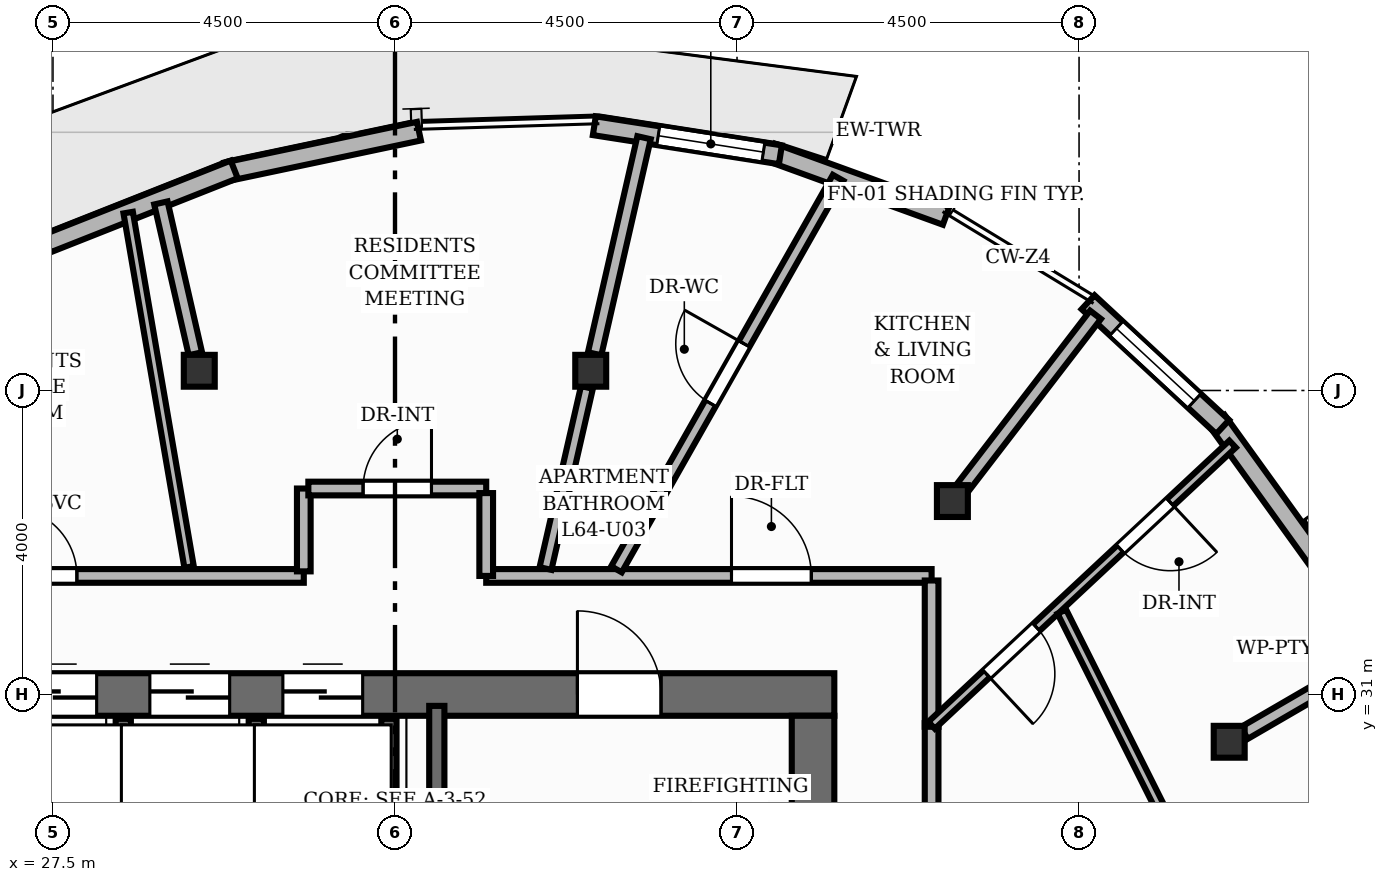
"""IFC4 building model, lengths in metres.
Left out: names, types, materials, properties, quantities, classifications, styles, units other than length and angle.
Written with IfcOpenShell. Run it as: python <this file> out.ifc"""

import sys

from ifc_helpers import new_model, si_unit, direction, frame, frame_2d, origin, origin_2d, place, context, subcontext, project, spatial, rectangle, i_section, extrude, element, fill, save


model = new_model("IFC4")
c1 = context("Model", 3, precision=1e-05, world=origin(), true_north=direction((0.0, 1.0)))
c2 = subcontext(c1, "Body", "Model", "MODEL_VIEW")
j1 = project(units=[si_unit("LENGTHUNIT", "METRE"), si_unit("PLANEANGLEUNIT", "RADIAN")], contexts=[c1])
p1 = place(None, origin())
s1 = spatial("IfcSite", under=j1, at=p1, CompositionType="ELEMENT")
p2 = place(p1, origin())
s2 = spatial("IfcBuilding", under=s1, at=p2, CompositionType="ELEMENT")
p3 = place(p2, frame((0.0, 0.0, 214.24)))
s3 = spatial("IfcBuildingStorey", under=s2, at=p3, CompositionType="ELEMENT", Elevation=214.24)
p4 = place(p3, frame((26.22, 31.0, 0.0), z_axis=(0.0, 0.0, 1.0), x_axis=(1.0, 0.0, 0.0)))
e1 = element("IfcWall", 1, at=p4, inside=s3, PredefinedType="SHEAR", context=c2, shape_type="SweptSolid", body=[
    extrude(rectangle(XDim=11.56, YDim=0.56, at=frame_2d((5.78, 0.0))), origin(), (0.0, 0.0, 1.0), 3.2),
])
p5 = place(p4, frame((8.18, 0.0, 0.0)))
e2 = element("IfcOpeningElement", 2, at=p5, cuts=e1, PredefinedType="OPENING", context=c2, shape_type="SweptSolid", body=[
    extrude(rectangle(XDim=1.1, YDim=2.15, at=frame_2d((0.55, 1.075))), frame((0.0, 0.29, 0.0), z_axis=(0.0, -1.0, 0.0), x_axis=(1.0, 0.0, 0.0)), (0.0, 0.0, 1.0), 0.58),
])
p6 = place(p4, frame((0.805, 0.0, 0.0)))
e3 = element("IfcOpeningElement", 3, at=p6, cuts=e1, PredefinedType="OPENING", context=c2, shape_type="SweptSolid", body=[
    extrude(rectangle(XDim=1.05, YDim=2.15, at=frame_2d((0.525, 1.075))), frame((0.0, 0.29, 0.0), z_axis=(0.0, -1.0, 0.0), x_axis=(1.0, 0.0, 0.0)), (0.0, 0.0, 1.0), 0.58),
])
p7 = place(p4, frame((2.555, 0.0, 0.0)))
e4 = element("IfcOpeningElement", 4, at=p7, cuts=e1, PredefinedType="OPENING", context=c2, shape_type="SweptSolid", body=[
    extrude(rectangle(XDim=1.05, YDim=2.15, at=frame_2d((0.525, 1.075))), frame((0.0, 0.29, 0.0), z_axis=(0.0, -1.0, 0.0), x_axis=(1.0, 0.0, 0.0)), (0.0, 0.0, 1.0), 0.58),
])
p8 = place(p4, frame((4.305, 0.0, 0.0)))
e5 = element("IfcOpeningElement", 5, at=p8, cuts=e1, PredefinedType="OPENING", context=c2, shape_type="SweptSolid", body=[
    extrude(rectangle(XDim=1.05, YDim=2.15, at=frame_2d((0.525, 1.075))), frame((0.0, 0.29, 0.0), z_axis=(0.0, -1.0, 0.0), x_axis=(1.0, 0.0, 0.0)), (0.0, 0.0, 1.0), 0.58),
])
p9 = place(p3, frame((37.5, 17.28, 0.0), z_axis=(0.0, 0.0, 1.0), x_axis=(0.0, 1.0, 0.0)))
e6 = element("IfcWall", 6, at=p9, inside=s3, PredefinedType="SHEAR", context=c2, shape_type="SweptSolid", body=[
    extrude(rectangle(XDim=13.44, YDim=0.56, at=frame_2d((6.72, 0.0))), origin(), (0.0, 0.0, 1.0), 3.2),
])
for number, where, z_axis, x_axis in (
    (7, (42.975, 30.378, 0.0), (0.0, 0.0, 1.0), (1.0, 0.0, 0.0)),
    (8, (39.333, 33.545, 0.0), (0.0, 0.0, 1.0), (1.0, 0.0, 0.0)),
    (9, (34.575, 35.26, 0.0), (0.0, 0.0, 1.0), (1.0, 0.0, 0.0)),
    (10, (29.425, 35.26, 0.0), (0.0, 0.0, 1.0), (1.0, 0.0, 0.0)),
):
    element("IfcColumn", number, at=place(p3, frame(where, z_axis=z_axis, x_axis=x_axis)), inside=s3, PredefinedType="COLUMN", context=c2, shape_type="SweptSolid", body=[
        extrude(i_section(OverallWidth=0.407, OverallDepth=0.419, WebThickness=0.031, FlangeThickness=0.049, at=origin_2d()), origin(), (0.0, 0.0, 1.0), 3.2),
    ])
p10 = place(p3, frame((36.96, 38.13, 0.0), z_axis=(0.0, 0.0, 1.0), x_axis=(0.939954186413, -0.341300640851, 0.0)))
e11 = element("IfcWall", 11, at=p10, inside=s3, PredefinedType="SOLIDWALL", context=c2, shape_type="SweptSolid", body=[
    extrude(rectangle(XDim=2.437, YDim=0.25, at=frame_2d((1.219, 0.0))), origin(), (0.0, 0.0, 1.0), 2.96),
])
p11 = place(p3, frame((34.622, 38.484, 0.0), z_axis=(0.0, 0.0, 1.0), x_axis=(0.988040195026, -0.154196540209, 0.0)))
e12 = element("IfcWall", 12, at=p11, inside=s3, PredefinedType="SOLIDWALL", context=c2, shape_type="SweptSolid", body=[
    extrude(rectangle(XDim=2.478, YDim=0.25, at=frame_2d((1.239, 0.0))), origin(), (0.0, 0.0, 1.0), 2.96),
])
p12 = place(p11, frame((0.851, 0.0, 0.85)))
e13 = element("IfcOpeningElement", 13, at=p12, cuts=e12, PredefinedType="OPENING", context=c2, shape_type="SweptSolid", body=[
    extrude(rectangle(XDim=1.4, YDim=1.52, at=frame_2d((0.7, 0.76))), frame((0.0, 0.135, 0.0), z_axis=(0.0, -1.0, 0.0), x_axis=(1.0, 0.0, 0.0)), (0.0, 0.0, 1.0), 0.27),
])
p13 = place(p3, frame((29.779, 37.877, 0.0), z_axis=(0.0, 0.0, 1.0), x_axis=(0.978434707222, 0.206556345104, 0.0)))
e14 = element("IfcWall", 14, at=p13, inside=s3, PredefinedType="SOLIDWALL", context=c2, shape_type="SweptSolid", body=[
    extrude(rectangle(XDim=2.592, YDim=0.25, at=frame_2d((1.296, 0.0))), origin(), (0.0, 0.0, 1.0), 2.96),
])
p14 = place(p3, frame((27.42, 36.933, 0.0), z_axis=(0.0, 0.0, 1.0), x_axis=(0.929861098324, 0.36791077427, 0.0)))
e15 = element("IfcWall", 15, at=p14, inside=s3, PredefinedType="SOLIDWALL", context=c2, shape_type="SweptSolid", body=[
    extrude(rectangle(XDim=2.651, YDim=0.25, at=frame_2d((1.326, 0.0))), origin(), (0.0, 0.0, 1.0), 2.96),
])
p15 = place(p3, frame((42.814, 34.605, 0.0), z_axis=(0.0, 0.0, 1.0), x_axis=(0.584824573101, -0.811159798497, 0.0)))
e16 = element("IfcWall", 16, at=p15, inside=s3, PredefinedType="SOLIDWALL", context=c2, shape_type="SweptSolid", body=[
    extrude(rectangle(XDim=2.437, YDim=0.25, at=frame_2d((1.218, 0.0))), origin(), (0.0, 0.0, 1.0), 2.96),
])
p16 = place(p3, frame((41.119, 36.161, 0.0), z_axis=(0.0, 0.0, 1.0), x_axis=(0.733441361842, -0.679752726173, 0.0)))
e17 = element("IfcWall", 17, at=p16, inside=s3, PredefinedType="SOLIDWALL", context=c2, shape_type="SweptSolid", body=[
    extrude(rectangle(XDim=2.415, YDim=0.25, at=frame_2d((1.207, 0.0))), origin(), (0.0, 0.0, 1.0), 2.96),
])
p17 = place(p16, frame((0.507, 0.0, 0.85)))
e18 = element("IfcOpeningElement", 18, at=p17, cuts=e17, PredefinedType="OPENING", context=c2, shape_type="SweptSolid", body=[
    extrude(rectangle(XDim=1.4, YDim=1.55, at=frame_2d((0.7, 0.775))), frame((0.0, 0.135, 0.0), z_axis=(0.0, -1.0, 0.0), x_axis=(1.0, 0.0, 0.0)), (0.0, 0.0, 1.0), 0.27),
])
p18 = place(p3, frame((32.55, 27.35, 0.0), z_axis=(0.0, 0.0, 1.0), x_axis=(0.0, 1.0, 0.0)))
e19 = element("IfcWall", 19, at=p18, inside=s3, PredefinedType="SHEAR", context=c2, shape_type="SweptSolid", body=[
    extrude(rectangle(XDim=3.5, YDim=0.2, at=frame_2d((1.75, 0.0))), origin(), (0.0, 0.0, 1.0), 3.2),
])
for number, where, z_axis, x_axis in (
    (20, (31.92, 29.02, 0.0), (0.0, 0.0, 1.0), (0.0, 1.0, 0.0)),
    (21, (28.425, 29.02, 0.0), (0.0, 0.0, 1.0), (0.0, 1.0, 0.0)),
    (22, (30.175, 29.02, 0.0), (0.0, 0.0, 1.0), (0.0, 1.0, 0.0)),
):
    element("IfcWall", number, at=place(p3, frame(where, z_axis=z_axis, x_axis=x_axis)), inside=s3, PredefinedType="SHEAR", context=c2, shape_type="SweptSolid", body=[
        extrude(rectangle(XDim=1.66, YDim=0.2, at=frame_2d((0.83, 0.0))), origin(), (0.0, 0.0, 1.0), 3.2),
    ])
p19 = place(p3, frame((43.174, 30.493, 0.0), z_axis=(0.0, 0.0, 1.0), x_axis=(0.864637155841, 0.502396843879, 0.0)))
e23 = element("IfcWall", 23, at=p19, inside=s3, PredefinedType="PARTITIONING", context=c2, shape_type="SweptSolid", body=[
    extrude(rectangle(XDim=1.803, YDim=0.18, at=frame_2d((0.901, 0.0))), origin(), (0.0, 0.0, 1.0), 2.403),
])
p20 = place(p3, frame((39.473, 33.727, 0.0), z_axis=(0.0, 0.0, 1.0), x_axis=(0.609244614772, 0.792982344931, 0.0)))
e24 = element("IfcWall", 24, at=p20, inside=s3, PredefinedType="PARTITIONING", context=c2, shape_type="SweptSolid", body=[
    extrude(rectangle(XDim=2.861, YDim=0.18, at=frame_2d((1.43, 0.0))), origin(), (0.0, 0.0, 1.0), 2.403),
])
p21 = place(p3, frame((34.626, 35.483, 0.0), z_axis=(0.0, 0.0, 1.0), x_axis=(0.222945280676, 0.974830960641, 0.0)))
e25 = element("IfcWall", 25, at=p21, inside=s3, PredefinedType="PARTITIONING", context=c2, shape_type="SweptSolid", body=[
    extrude(rectangle(XDim=2.916, YDim=0.18, at=frame_2d((1.458, 0.0))), origin(), (0.0, 0.0, 1.0), 2.403),
])
p22 = place(p3, frame((29.374, 35.483, 0.0), z_axis=(0.0, 0.0, 1.0), x_axis=(-0.222932254148, 0.974833939736, 0.0)))
e26 = element("IfcWall", 26, at=p22, inside=s3, PredefinedType="PARTITIONING", context=c2, shape_type="SweptSolid", body=[
    extrude(rectangle(XDim=2.036, YDim=0.18, at=frame_2d((1.018, 0.0))), origin(), (0.0, 0.0, 1.0), 2.403),
])
p23 = place(p3, frame((39.06, 30.623, 0.0), z_axis=(0.0, 0.0, 1.0), x_axis=(0.0, -1.0, 0.0)))
e27 = element("IfcWall", 27, at=p23, inside=s3, PredefinedType="PARTITIONING", context=c2, shape_type="SweptSolid", body=[
    extrude(rectangle(XDim=15.183, YDim=0.18, at=frame_2d((7.591, 0.0))), origin(), (0.0, 0.0, 1.0), 2.955),
])
p24 = place(p23, frame((8.656, 0.0, 0.0)))
e28 = element("IfcOpeningElement", 28, at=p24, cuts=e27, PredefinedType="OPENING", context=c2, shape_type="SweptSolid", body=[
    extrude(rectangle(XDim=1.05, YDim=2.15, at=frame_2d((0.525, 1.075))), frame((0.0, 0.1, 0.0), z_axis=(0.0, -1.0, 0.0), x_axis=(1.0, 0.0, 0.0)), (0.0, 0.0, 1.0), 0.2),
])
p25 = place(p3, frame((33.2, 32.56, 0.0), z_axis=(0.0, 0.0, 1.0), x_axis=(1.0, 0.0, 0.0)))
e29 = element("IfcWall", 29, at=p25, inside=s3, PredefinedType="PARTITIONING", context=c2, shape_type="SweptSolid", body=[
    extrude(rectangle(XDim=5.86, YDim=0.18, at=frame_2d((2.93, 0.0))), origin(), (0.0, 0.0, 1.0), 2.955),
])
p26 = place(p25, frame((3.227, 0.0, 0.0)))
e30 = element("IfcOpeningElement", 30, at=p26, cuts=e29, PredefinedType="OPENING", context=c2, shape_type="SweptSolid", body=[
    extrude(rectangle(XDim=1.05, YDim=2.15, at=frame_2d((0.525, 1.075))), frame((0.0, 0.1, 0.0), z_axis=(0.0, -1.0, 0.0), x_axis=(1.0, 0.0, 0.0)), (0.0, 0.0, 1.0), 0.2),
])
p27 = place(p3, frame((39.06, 32.5, 0.0), z_axis=(0.0, 0.0, 1.0), x_axis=(0.0, -1.0, 0.0)))
e31 = element("IfcWall", 31, at=p27, inside=s3, PredefinedType="PARTITIONING", context=c2, shape_type="SweptSolid", body=[
    extrude(rectangle(XDim=1.925, YDim=0.18, at=frame_2d((0.962, 0.0))), origin(), (0.0, 0.0, 1.0), 2.955),
])
p28 = place(p3, frame((24.94, 32.56, 0.0), z_axis=(0.0, 0.0, 1.0), x_axis=(1.0, 0.0, 0.0)))
e32 = element("IfcWall", 32, at=p28, inside=s3, PredefinedType="PARTITIONING", context=c2, shape_type="SweptSolid", body=[
    extrude(rectangle(XDim=5.86, YDim=0.18, at=frame_2d((2.93, 0.0))), origin(), (0.0, 0.0, 1.0), 2.955),
])
p29 = place(p28, frame((1.975, 0.0, 0.0)))
e33 = element("IfcOpeningElement", 33, at=p29, cuts=e32, PredefinedType="OPENING", context=c2, shape_type="SweptSolid", body=[
    extrude(rectangle(XDim=0.9, YDim=2.1, at=frame_2d((0.45, 1.05))), frame((0.0, 0.1, 0.0), z_axis=(0.0, -1.0, 0.0), x_axis=(1.0, 0.0, 0.0)), (0.0, 0.0, 1.0), 0.2),
])
p30 = place(p3, frame((30.8, 32.62, 0.0), z_axis=(0.0, 0.0, 1.0), x_axis=(0.0, 1.0, 0.0)))
e34 = element("IfcWall", 34, at=p30, inside=s3, PredefinedType="PARTITIONING", context=c2, shape_type="SweptSolid", body=[
    extrude(rectangle(XDim=1.09, YDim=0.18, at=frame_2d((0.545, 0.0))), origin(), (0.0, 0.0, 1.0), 2.955),
])
p31 = place(p3, frame((30.86, 33.71, 0.0), z_axis=(0.0, 0.0, 1.0), x_axis=(1.0, 0.0, 0.0)))
e35 = element("IfcWall", 35, at=p31, inside=s3, PredefinedType="PARTITIONING", context=c2, shape_type="SweptSolid", body=[
    extrude(rectangle(XDim=2.34, YDim=0.18, at=frame_2d((1.17, 0.0))), origin(), (0.0, 0.0, 1.0), 2.955),
])
p32 = place(p31, frame((0.72, 0.0, 0.0)))
e36 = element("IfcOpeningElement", 36, at=p32, cuts=e35, PredefinedType="OPENING", context=c2, shape_type="SweptSolid", body=[
    extrude(rectangle(XDim=0.9, YDim=2.1, at=frame_2d((0.45, 1.05))), frame((0.0, 0.1, 0.0), z_axis=(0.0, -1.0, 0.0), x_axis=(1.0, 0.0, 0.0)), (0.0, 0.0, 1.0), 0.2),
])
p33 = place(p3, frame((33.2, 33.65, 0.0), z_axis=(0.0, 0.0, 1.0), x_axis=(0.0, -1.0, 0.0)))
e37 = element("IfcWall", 37, at=p33, inside=s3, PredefinedType="PARTITIONING", context=c2, shape_type="SweptSolid", body=[
    extrude(rectangle(XDim=1.09, YDim=0.18, at=frame_2d((0.545, 0.0))), origin(), (0.0, 0.0, 1.0), 2.955),
])
p34 = place(p3, frame((34.914, 32.647, 0.0), z_axis=(0.0, 0.0, 1.0), x_axis=(0.492777372346, 0.870155423648, 0.0)))
e38 = element("IfcWall", 38, at=p34, inside=s3, PredefinedType="PLUMBINGWALL", context=c2, shape_type="SweptSolid", body=[
    extrude(rectangle(XDim=5.919, YDim=0.16, at=frame_2d((2.96, 0.0))), origin(), (0.0, 0.0, 1.0), 2.692),
])
p35 = place(p34, frame((2.51, 0.0, 0.0)))
e39 = element("IfcOpeningElement", 39, at=p35, cuts=e38, PredefinedType="OPENING", context=c2, shape_type="SweptSolid", body=[
    extrude(rectangle(XDim=0.9, YDim=2.1, at=frame_2d((0.45, 1.05))), frame((0.0, 0.09, 0.0), z_axis=(0.0, -1.0, 0.0), x_axis=(1.0, 0.0, 0.0)), (0.0, 0.0, 1.0), 0.18),
])
p36 = place(p3, frame((43.02, 34.294, 0.0), z_axis=(0.0, 0.0, 1.0), x_axis=(-0.730757039427, -0.682637641307, 0.0)))
e40 = element("IfcWall", 40, at=p36, inside=s3, PredefinedType="PARTITIONING", context=c2, shape_type="SweptSolid", body=[
    extrude(rectangle(XDim=5.419, YDim=0.125, at=frame_2d((2.709, 0.0))), origin(), (0.0, 0.0, 1.0), 2.955),
])
p37 = place(p36, frame((1.122, 0.0, 0.0)))
e41 = element("IfcOpeningElement", 41, at=p37, cuts=e40, PredefinedType="OPENING", context=c2, shape_type="SweptSolid", body=[
    extrude(rectangle(XDim=0.9, YDim=2.1, at=frame_2d((0.45, 1.05))), frame((0.0, 0.073, 0.0), z_axis=(0.0, -1.0, 0.0), x_axis=(1.0, 0.0, 0.0)), (0.0, 0.0, 1.0), 0.145),
])
p38 = place(p36, frame((3.531, 0.0, 0.0)))
e42 = element("IfcOpeningElement", 42, at=p38, cuts=e40, PredefinedType="OPENING", context=c2, shape_type="SweptSolid", body=[
    extrude(rectangle(XDim=0.9, YDim=2.1, at=frame_2d((0.45, 1.05))), frame((0.0, 0.073, 0.0), z_axis=(0.0, -1.0, 0.0), x_axis=(1.0, 0.0, 0.0)), (0.0, 0.0, 1.0), 0.145),
])
p39 = place(p3, frame((33.98, 32.657, 0.0), z_axis=(0.0, 0.0, 1.0), x_axis=(0.223006482474, 0.974816961678, 0.0)))
e43 = element("IfcWall", 43, at=p39, inside=s3, PredefinedType="PLUMBINGWALL", context=c2, shape_type="SweptSolid", body=[
    extrude(rectangle(XDim=2.445, YDim=0.16, at=frame_2d((1.222, 0.0))), origin(), (0.0, 0.0, 1.0), 2.403),
])
p40 = place(p3, frame((43.768, 26.114, 0.0), z_axis=(0.0, 0.0, 1.0), x_axis=(-0.447958394428, 0.894054403748, 0.0)))
e44 = element("IfcWall", 44, at=p40, inside=s3, PredefinedType="PARTITIONING", context=c2, shape_type="SweptSolid", body=[
    extrude(rectangle(XDim=6.686, YDim=0.125, at=frame_2d((3.343, 0.0))), origin(), (0.0, 0.0, 1.0), 2.488),
])
p41 = place(p3, frame((28.49, 37.341, 0.0), z_axis=(0.0, 0.0, 1.0), x_axis=(0.169376334169, -0.98555144839, 0.0)))
e45 = element("IfcWall", 45, at=p41, inside=s3, PredefinedType="PARTITIONING", context=c2, shape_type="SweptSolid", body=[
    extrude(rectangle(XDim=4.731, YDim=0.125, at=frame_2d((2.365, 0.0))), origin(), (0.0, 0.0, 1.0), 2.955),
])
p42 = place(p12, origin())
e46 = element("IfcWindow", 46, at=p42, inside=s3, PartitioningType="SINGLE_PANEL", PredefinedType="WINDOW", context=c2, shape_type="SweptSolid", body=[
    extrude(rectangle(XDim=1.4, YDim=1.52, at=frame_2d((0.7, 0.76))), frame((0.0, 0.03, 0.0), z_axis=(0.0, -1.0, 0.0), x_axis=(1.0, 0.0, 0.0)), (0.0, 0.0, 1.0), 0.06),
])
fill(e13, e46)
p43 = place(p17, origin())
e47 = element("IfcWindow", 47, at=p43, inside=s3, PartitioningType="SINGLE_PANEL", PredefinedType="WINDOW", context=c2, shape_type="SweptSolid", body=[
    extrude(rectangle(XDim=1.4, YDim=1.55, at=frame_2d((0.7, 0.775))), frame((0.0, 0.03, 0.0), z_axis=(0.0, -1.0, 0.0), x_axis=(1.0, 0.0, 0.0)), (0.0, 0.0, 1.0), 0.06),
])
fill(e18, e47)
p44 = place(p5, origin())
e48 = element("IfcDoor", 48, at=p44, inside=s3, OperationType="SINGLE_SWING_LEFT", PredefinedType="DOOR", context=c2, shape_type="SweptSolid", body=[
    extrude(rectangle(XDim=1.1, YDim=2.15, at=frame_2d((0.55, 1.075))), frame((0.0, 0.025, 0.0), z_axis=(0.0, -1.0, 0.0), x_axis=(1.0, 0.0, 0.0)), (0.0, 0.0, 1.0), 0.05),
])
fill(e2, e48)
p45 = place(p6, origin())
e49 = element("IfcDoor", 49, at=p45, inside=s3, OperationType="DOUBLE_DOOR_SLIDING", PredefinedType="DOOR", context=c2, shape_type="SweptSolid", body=[
    extrude(rectangle(XDim=1.05, YDim=2.15, at=frame_2d((0.525, 1.075))), frame((0.0, 0.025, 0.0), z_axis=(0.0, -1.0, 0.0), x_axis=(1.0, 0.0, 0.0)), (0.0, 0.0, 1.0), 0.05),
])
fill(e3, e49)
p46 = place(p7, origin())
e50 = element("IfcDoor", 50, at=p46, inside=s3, OperationType="DOUBLE_DOOR_SLIDING", PredefinedType="DOOR", context=c2, shape_type="SweptSolid", body=[
    extrude(rectangle(XDim=1.05, YDim=2.15, at=frame_2d((0.525, 1.075))), frame((0.0, 0.025, 0.0), z_axis=(0.0, -1.0, 0.0), x_axis=(1.0, 0.0, 0.0)), (0.0, 0.0, 1.0), 0.05),
])
fill(e4, e50)
p47 = place(p8, origin())
e51 = element("IfcDoor", 51, at=p47, inside=s3, OperationType="DOUBLE_DOOR_SLIDING", PredefinedType="DOOR", context=c2, shape_type="SweptSolid", body=[
    extrude(rectangle(XDim=1.05, YDim=2.15, at=frame_2d((0.525, 1.075))), frame((0.0, 0.025, 0.0), z_axis=(0.0, -1.0, 0.0), x_axis=(1.0, 0.0, 0.0)), (0.0, 0.0, 1.0), 0.05),
])
fill(e5, e51)
p48 = place(p26, origin())
e52 = element("IfcDoor", 52, at=p48, inside=s3, OperationType="SINGLE_SWING_LEFT", PredefinedType="DOOR", context=c2, shape_type="SweptSolid", body=[
    extrude(rectangle(XDim=1.05, YDim=2.15, at=frame_2d((0.525, 1.075))), frame((0.0, 0.025, 0.0), z_axis=(0.0, -1.0, 0.0), x_axis=(1.0, 0.0, 0.0)), (0.0, 0.0, 1.0), 0.05),
])
fill(e30, e52)
p49 = place(p35, origin())
e53 = element("IfcDoor", 53, at=p49, inside=s3, OperationType="SINGLE_SWING_RIGHT", PredefinedType="DOOR", context=c2, shape_type="SweptSolid", body=[
    extrude(rectangle(XDim=0.9, YDim=2.1, at=frame_2d((0.45, 1.05))), frame((0.0, 0.025, 0.0), z_axis=(0.0, -1.0, 0.0), x_axis=(1.0, 0.0, 0.0)), (0.0, 0.0, 1.0), 0.05),
])
fill(e39, e53)
p50 = place(p37, origin())
e54 = element("IfcDoor", 54, at=p50, inside=s3, OperationType="SINGLE_SWING_LEFT", PredefinedType="DOOR", context=c2, shape_type="SweptSolid", body=[
    extrude(rectangle(XDim=0.9, YDim=2.1, at=frame_2d((0.45, 1.05))), frame((0.0, 0.025, 0.0), z_axis=(0.0, -1.0, 0.0), x_axis=(1.0, 0.0, 0.0)), (0.0, 0.0, 1.0), 0.05),
])
fill(e41, e54)
p51 = place(p38, origin())
e55 = element("IfcDoor", 55, at=p51, inside=s3, OperationType="SINGLE_SWING_RIGHT", PredefinedType="DOOR", context=c2, shape_type="SweptSolid", body=[
    extrude(rectangle(XDim=0.9, YDim=2.1, at=frame_2d((0.45, 1.05))), frame((0.0, 0.025, 0.0), z_axis=(0.0, -1.0, 0.0), x_axis=(1.0, 0.0, 0.0)), (0.0, 0.0, 1.0), 0.05),
])
fill(e42, e55)
p52 = place(p29, origin())
e56 = element("IfcDoor", 56, at=p52, inside=s3, OperationType="SINGLE_SWING_LEFT", PredefinedType="DOOR", context=c2, shape_type="SweptSolid", body=[
    extrude(rectangle(XDim=0.9, YDim=2.1, at=frame_2d((0.45, 1.05))), frame((0.0, 0.025, 0.0), z_axis=(0.0, -1.0, 0.0), x_axis=(1.0, 0.0, 0.0)), (0.0, 0.0, 1.0), 0.05),
])
fill(e33, e56)
p53 = place(p32, origin())
e57 = element("IfcDoor", 57, at=p53, inside=s3, OperationType="SINGLE_SWING_RIGHT", PredefinedType="DOOR", context=c2, shape_type="SweptSolid", body=[
    extrude(rectangle(XDim=0.9, YDim=2.1, at=frame_2d((0.45, 1.05))), frame((0.0, 0.025, 0.0), z_axis=(0.0, -1.0, 0.0), x_axis=(1.0, 0.0, 0.0)), (0.0, 0.0, 1.0), 0.05),
])
fill(e36, e57)
save(model, sys.argv[1])
